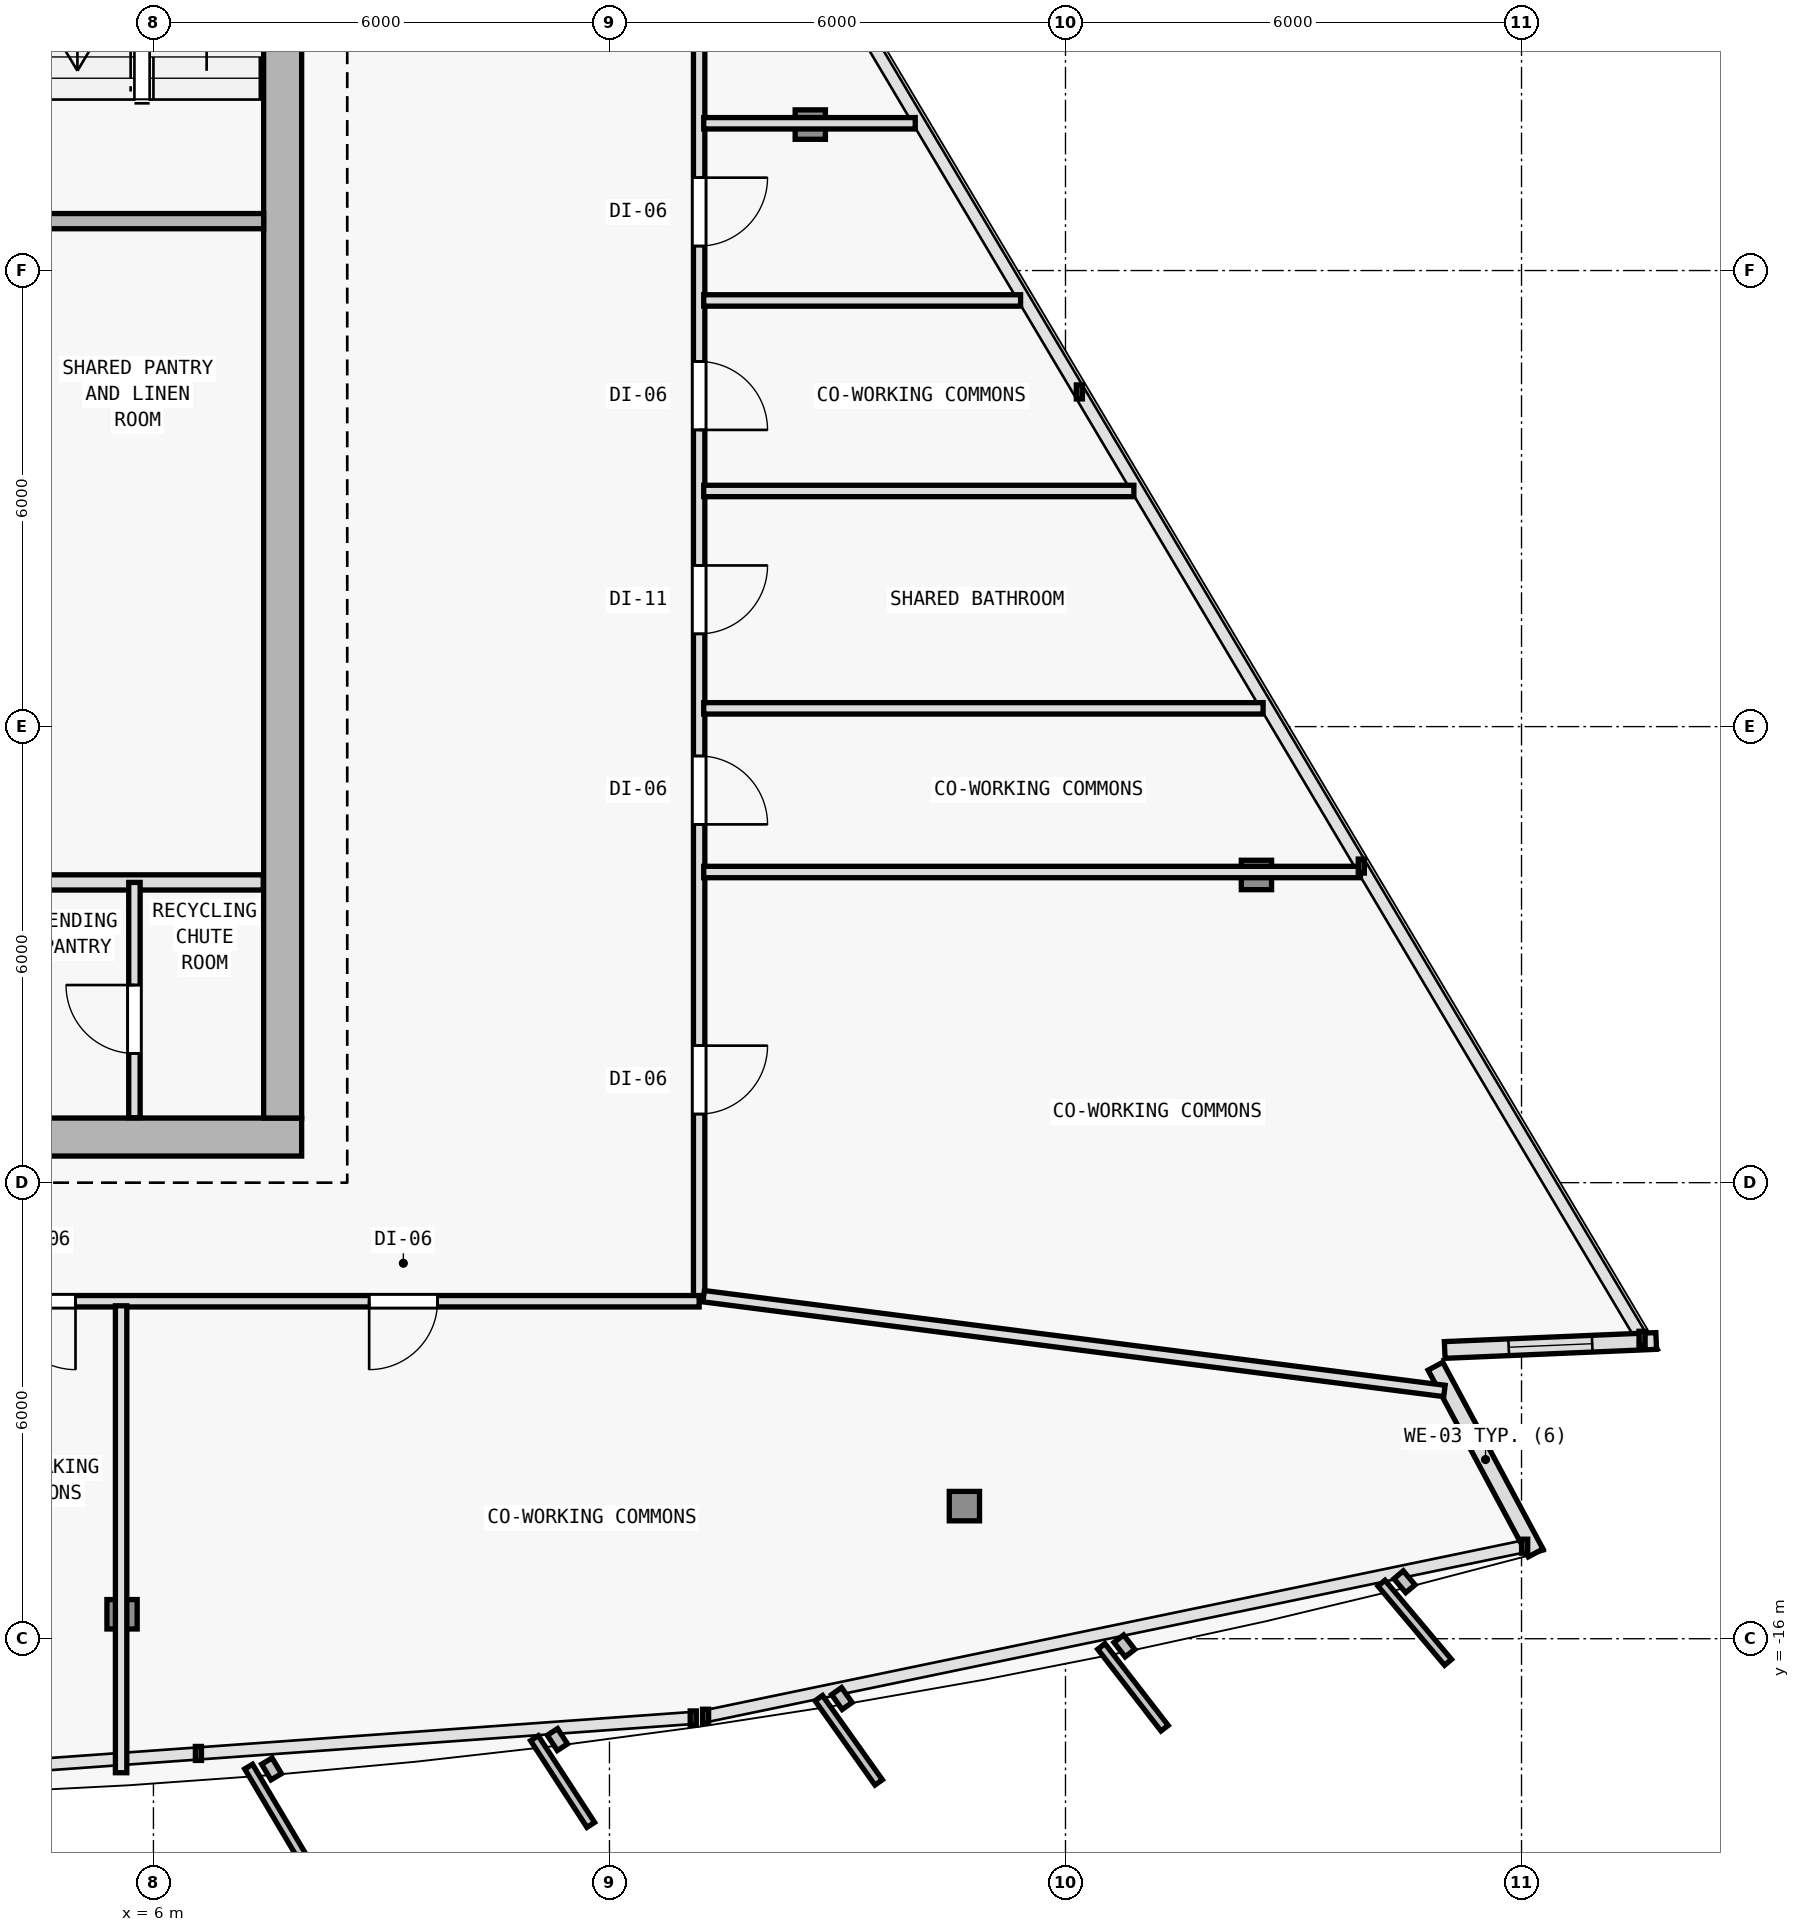
"""IFC4 building model, lengths in metres.
Left out: names, types, materials, properties, quantities, classifications, styles, units other than length and angle.
Written with IfcOpenShell. Run it as: python <this file> out.ifc"""

import sys

from ifc_helpers import new_model, si_unit, direction, frame, frame_2d, origin, origin_2d, place, context, subcontext, project, spatial, rectangle, i_section, extrude, element, fill, save


model = new_model("IFC4")
c1 = context("Model", 3, precision=1e-05, world=origin(), true_north=direction((0.0, 1.0)))
c2 = subcontext(c1, "Body", "Model", "MODEL_VIEW")
j1 = project(units=[si_unit("LENGTHUNIT", "METRE"), si_unit("PLANEANGLEUNIT", "RADIAN")], contexts=[c1])
p1 = place(None, origin())
s1 = spatial("IfcSite", under=j1, at=p1, CompositionType="ELEMENT")
p2 = place(p1, origin())
s2 = spatial("IfcBuilding", under=s1, at=p2, CompositionType="ELEMENT")
p3 = place(p2, frame((0.0, 0.0, 212.7)))
s3 = spatial("IfcBuildingStorey", under=s2, at=p3, CompositionType="ELEMENT", Elevation=212.7)
for number, where, z_axis, x_axis in (
    (1, (7.7, -9.4, 0.0), (0.0, 0.0, 1.0), (1.0, 0.0, 0.0)),
    (2, (7.7, 0.4, 0.0), (0.0, 0.0, 1.0), (1.0, 0.0, 0.0)),
):
    element("IfcColumn", number, at=place(p3, frame(where, z_axis=z_axis, x_axis=x_axis)), inside=s3, PredefinedType="COLUMN", context=c2, shape_type="SweptSolid", body=[
        extrude(i_section(OverallWidth=0.398, OverallDepth=0.387, WebThickness=0.013, FlangeThickness=0.022, FilletRadius=0.015, at=origin_2d()), origin(), (0.0, 0.0, 1.0), 3.6),
    ])
p4 = place(p3, frame((5.587, -15.678, 0.006), z_axis=(-0.006866324617, 0.035215407439, 0.999356157066), x_axis=(-0.981516643497, -0.191376797284, 0.0)))
e3 = element("IfcColumn", 3, at=p4, inside=s3, PredefinedType="COLUMN", context=c2, shape_type="SweptSolid", body=[
    extrude(i_section(OverallWidth=0.398, OverallDepth=0.387, WebThickness=0.013, FlangeThickness=0.022, FilletRadius=0.015, at=origin_2d()), origin(), (0.0, 0.0, 1.0), 3.591),
])
p5 = place(p3, frame((16.67, -14.255, 0.006), z_axis=(-0.020596292833, 0.033511459955, 0.999226087917), x_axis=(-0.851954850327, -0.523615252838, 0.0)))
e4 = element("IfcColumn", 4, at=p5, inside=s3, PredefinedType="COLUMN", context=c2, shape_type="SweptSolid", body=[
    extrude(i_section(OverallWidth=0.398, OverallDepth=0.387, WebThickness=0.013, FlangeThickness=0.022, FilletRadius=0.015, at=origin_2d()), origin(), (0.0, 0.0, 1.0), 3.592),
])
p6 = place(p3, frame((20.512, -5.952, 0.006), z_axis=(-0.026107436898, 0.021620221181, 0.999425318758), x_axis=(-0.637813971185, -0.770190455771, 0.0)))
e5 = element("IfcColumn", 5, at=p6, inside=s3, PredefinedType="COLUMN", context=c2, shape_type="SweptSolid", body=[
    extrude(i_section(OverallWidth=0.398, OverallDepth=0.387, WebThickness=0.013, FlangeThickness=0.022, FilletRadius=0.015, at=origin_2d()), origin(), (0.0, 0.0, 1.0), 3.591),
])
p7 = place(p3, frame((14.642, 3.92, 0.006), z_axis=(-0.018907326549, 0.00952167524, 0.999775900241), x_axis=(-0.449781931574, -0.893138406984, 0.0)))
e6 = element("IfcColumn", 6, at=p7, inside=s3, PredefinedType="COLUMN", context=c2, shape_type="SweptSolid", body=[
    extrude(i_section(OverallWidth=0.398, OverallDepth=0.387, WebThickness=0.013, FlangeThickness=0.022, FilletRadius=0.015, at=origin_2d()), origin(), (0.0, 0.0, 1.0), 3.59),
])
p8 = place(p3, frame((22.868, -12.415, 0.0), z_axis=(0.0, 0.0, 1.0), x_axis=(0.472845900162, -0.881145138272, 0.0)))
e7 = element("IfcWall", 7, at=p8, inside=s3, PredefinedType="SOLIDWALL", context=c2, shape_type="SweptSolid", body=[
    extrude(rectangle(XDim=2.788, YDim=0.22, at=frame_2d((1.394, 0.0))), origin(), (0.0, 0.0, 1.0), 3.35),
])
p9 = place(p3, frame((25.772, -12.083, 0.0), z_axis=(0.0, 0.0, 1.0), x_axis=(-0.999095761456, -0.042516578425, 0.0)))
e8 = element("IfcWall", 8, at=p9, inside=s3, PredefinedType="SOLIDWALL", context=c2, shape_type="SweptSolid", body=[
    extrude(rectangle(XDim=2.785, YDim=0.22, at=frame_2d((1.393, 0.0))), origin(), (0.0, 0.0, 1.0), 3.35),
])
p10 = place(p9, frame((0.843, 0.0, 0.62)))
e9 = element("IfcOpeningElement", 9, at=p10, cuts=e8, PredefinedType="OPENING", context=c2, shape_type="SweptSolid", body=[
    extrude(rectangle(XDim=1.1, YDim=1.8, at=frame_2d((0.55, 0.9))), frame((0.0, 0.12, 0.0), z_axis=(0.0, -1.0, 0.0), x_axis=(1.0, 0.0, 0.0)), (0.0, 0.0, 1.0), 0.24),
])
p11 = place(p3, frame((-7.95, -9.4, 0.0), z_axis=(0.0, 0.0, 1.0), x_axis=(1.0, 0.0, 0.0)))
e10 = element("IfcWall", 10, at=p11, inside=s3, PredefinedType="SHEAR", context=c2, shape_type="SweptSolid", body=[
    extrude(rectangle(XDim=15.9, YDim=0.5, at=frame_2d((7.95, 0.0))), origin(), (0.0, 0.0, 1.0), 3.35),
])
p12 = place(p11, frame((9.6, 0.0, 0.0)))
e11 = element("IfcOpeningElement", 11, at=p12, cuts=e10, PredefinedType="OPENING", context=c2, shape_type="SweptSolid", body=[
    extrude(rectangle(XDim=1.5, YDim=2.2, at=frame_2d((0.75, 1.1))), frame((0.0, 0.26, 0.0), z_axis=(0.0, -1.0, 0.0), x_axis=(1.0, 0.0, 0.0)), (0.0, 0.0, 1.0), 0.52),
])
p13 = place(p3, frame((7.7, 9.95, 0.0), z_axis=(0.0, 0.0, 1.0), x_axis=(0.0, -1.0, 0.0)))
e12 = element("IfcWall", 12, at=p13, inside=s3, PredefinedType="SHEAR", context=c2, shape_type="SweptSolid", body=[
    extrude(rectangle(XDim=19.1, YDim=0.5, at=frame_2d((9.55, 0.0))), origin(), (0.0, 0.0, 1.0), 3.35),
])
p14 = place(p3, frame((4.05, 2.65, 0.0), z_axis=(0.0, 0.0, 1.0), x_axis=(1.0, 0.0, 0.0)))
e13 = element("IfcWall", 13, at=p14, inside=s3, PredefinedType="SOLIDWALL", context=c2, shape_type="SweptSolid", body=[
    extrude(rectangle(XDim=3.4, YDim=0.2, at=frame_2d((1.7, 0.0))), origin(), (0.0, 0.0, 1.0), 3.35),
])
p15 = place(p3, frame((4.15, -6.05, 0.0), z_axis=(0.0, 0.0, 1.0), x_axis=(1.0, 0.0, 0.0)))
e14 = element("IfcWall", 14, at=p15, inside=s3, PredefinedType="SOLIDWALL", context=c2, shape_type="SweptSolid", body=[
    extrude(rectangle(XDim=3.295, YDim=0.2, at=frame_2d((1.647, 0.0))), origin(), (0.0, 0.0, 1.0), 3.35),
])
p16 = place(p3, frame((5.75, -9.145, 0.0), z_axis=(0.0, 0.0, 1.0), x_axis=(0.0, 1.0, 0.0)))
e15 = element("IfcWall", 15, at=p16, inside=s3, PredefinedType="PARTITIONING", context=c2, shape_type="SweptSolid", body=[
    extrude(rectangle(XDim=3.095, YDim=0.15, at=frame_2d((1.547, 0.0))), origin(), (0.0, 0.0, 1.0), 3.35),
])
p17 = place(p16, frame((0.845, 0.0, 0.0)))
e16 = element("IfcOpeningElement", 16, at=p17, cuts=e15, PredefinedType="OPENING", context=c2, shape_type="SweptSolid", body=[
    extrude(rectangle(XDim=0.9, YDim=2.1, at=frame_2d((0.45, 1.05))), frame((0.0, 0.085, 0.0), z_axis=(0.0, -1.0, 0.0), x_axis=(1.0, 0.0, 0.0)), (0.0, 0.0, 1.0), 0.17),
])
p18 = place(p3, frame((13.18, 8.444, 0.0), z_axis=(0.0, 0.0, 1.0), x_axis=(0.0, -1.0, 0.0)))
e17 = element("IfcWall", 17, at=p18, inside=s3, PredefinedType="PARTITIONING", context=c2, shape_type="SweptSolid", body=[
    extrude(rectangle(XDim=20.004, YDim=0.15, at=frame_2d((10.002, 0.0))), origin(), (0.0, 0.0, 1.0), 2.825),
])
p19 = place(p18, frame((16.641, 0.0, 0.0)))
e18 = element("IfcOpeningElement", 18, at=p19, cuts=e17, PredefinedType="OPENING", context=c2, shape_type="SweptSolid", body=[
    extrude(rectangle(XDim=0.9, YDim=2.1, at=frame_2d((0.45, 1.05))), frame((0.0, 0.085, 0.0), z_axis=(0.0, -1.0, 0.0), x_axis=(1.0, 0.0, 0.0)), (0.0, 0.0, 1.0), 0.17),
])
p20 = place(p18, frame((12.83, 0.0, 0.0)))
e19 = element("IfcOpeningElement", 19, at=p20, cuts=e17, PredefinedType="OPENING", context=c2, shape_type="SweptSolid", body=[
    extrude(rectangle(XDim=0.9, YDim=2.1, at=frame_2d((0.45, 1.05))), frame((0.0, 0.085, 0.0), z_axis=(0.0, -1.0, 0.0), x_axis=(1.0, 0.0, 0.0)), (0.0, 0.0, 1.0), 0.17),
])
p21 = place(p18, frame((10.324, 0.0, 0.0)))
e20 = element("IfcOpeningElement", 20, at=p21, cuts=e17, PredefinedType="OPENING", context=c2, shape_type="SweptSolid", body=[
    extrude(rectangle(XDim=0.9, YDim=2.1, at=frame_2d((0.45, 1.05))), frame((0.0, 0.085, 0.0), z_axis=(0.0, -1.0, 0.0), x_axis=(1.0, 0.0, 0.0)), (0.0, 0.0, 1.0), 0.17),
])
p22 = place(p18, frame((7.641, 0.0, 0.0)))
e21 = element("IfcOpeningElement", 21, at=p22, cuts=e17, PredefinedType="OPENING", context=c2, shape_type="SweptSolid", body=[
    extrude(rectangle(XDim=0.9, YDim=2.1, at=frame_2d((0.45, 1.05))), frame((0.0, 0.085, 0.0), z_axis=(0.0, -1.0, 0.0), x_axis=(1.0, 0.0, 0.0)), (0.0, 0.0, 1.0), 0.17),
])
p23 = place(p18, frame((5.222, 0.0, 0.0)))
e22 = element("IfcOpeningElement", 22, at=p23, cuts=e17, PredefinedType="OPENING", context=c2, shape_type="SweptSolid", body=[
    extrude(rectangle(XDim=0.9, YDim=2.1, at=frame_2d((0.45, 1.05))), frame((0.0, 0.085, 0.0), z_axis=(0.0, -1.0, 0.0), x_axis=(1.0, 0.0, 0.0)), (0.0, 0.0, 1.0), 0.17),
])
p24 = place(p3, frame((13.18, -11.56, 0.0), z_axis=(0.0, 0.0, 1.0), x_axis=(-1.0, 0.0, 0.0)))
e23 = element("IfcWall", 23, at=p24, inside=s3, PredefinedType="PARTITIONING", context=c2, shape_type="SweptSolid", body=[
    extrude(rectangle(XDim=23.04, YDim=0.15, at=frame_2d((11.52, 0.0))), origin(), (0.0, 0.0, 1.0), 2.825),
])
p25 = place(p24, frame((21.736, 0.0, 0.0)))
e24 = element("IfcOpeningElement", 24, at=p25, cuts=e23, PredefinedType="OPENING", context=c2, shape_type="SweptSolid", body=[
    extrude(rectangle(XDim=0.85, YDim=2.1, at=frame_2d((0.425, 1.05))), frame((0.0, 0.085, 0.0), z_axis=(0.0, -1.0, 0.0), x_axis=(1.0, 0.0, 0.0)), (0.0, 0.0, 1.0), 0.17),
])
p26 = place(p24, frame((20.304, 0.0, 0.0)))
e25 = element("IfcOpeningElement", 25, at=p26, cuts=e23, PredefinedType="OPENING", context=c2, shape_type="SweptSolid", body=[
    extrude(rectangle(XDim=0.85, YDim=2.1, at=frame_2d((0.425, 1.05))), frame((0.0, 0.085, 0.0), z_axis=(0.0, -1.0, 0.0), x_axis=(1.0, 0.0, 0.0)), (0.0, 0.0, 1.0), 0.17),
])
p27 = place(p24, frame((18.926, 0.0, 0.0)))
e26 = element("IfcOpeningElement", 26, at=p27, cuts=e23, PredefinedType="OPENING", context=c2, shape_type="SweptSolid", body=[
    extrude(rectangle(XDim=0.85, YDim=2.1, at=frame_2d((0.425, 1.05))), frame((0.0, 0.085, 0.0), z_axis=(0.0, -1.0, 0.0), x_axis=(1.0, 0.0, 0.0)), (0.0, 0.0, 1.0), 0.17),
])
p28 = place(p24, frame((17.057, 0.0, 0.0)))
e27 = element("IfcOpeningElement", 27, at=p28, cuts=e23, PredefinedType="OPENING", context=c2, shape_type="SweptSolid", body=[
    extrude(rectangle(XDim=0.9, YDim=2.1, at=frame_2d((0.45, 1.05))), frame((0.0, 0.085, 0.0), z_axis=(0.0, -1.0, 0.0), x_axis=(1.0, 0.0, 0.0)), (0.0, 0.0, 1.0), 0.17),
])
p29 = place(p24, frame((14.367, 0.0, 0.0)))
e28 = element("IfcOpeningElement", 28, at=p29, cuts=e23, PredefinedType="OPENING", context=c2, shape_type="SweptSolid", body=[
    extrude(rectangle(XDim=0.9, YDim=2.1, at=frame_2d((0.45, 1.05))), frame((0.0, 0.085, 0.0), z_axis=(0.0, -1.0, 0.0), x_axis=(1.0, 0.0, 0.0)), (0.0, 0.0, 1.0), 0.17),
])
p30 = place(p24, frame((11.09, 0.0, 0.0)))
e29 = element("IfcOpeningElement", 29, at=p30, cuts=e23, PredefinedType="OPENING", context=c2, shape_type="SweptSolid", body=[
    extrude(rectangle(XDim=0.9, YDim=2.1, at=frame_2d((0.45, 1.05))), frame((0.0, 0.085, 0.0), z_axis=(0.0, -1.0, 0.0), x_axis=(1.0, 0.0, 0.0)), (0.0, 0.0, 1.0), 0.17),
])
p31 = place(p24, frame((8.205, 0.0, 0.0)))
e30 = element("IfcOpeningElement", 30, at=p31, cuts=e23, PredefinedType="OPENING", context=c2, shape_type="SweptSolid", body=[
    extrude(rectangle(XDim=0.9, YDim=2.1, at=frame_2d((0.45, 1.05))), frame((0.0, 0.085, 0.0), z_axis=(0.0, -1.0, 0.0), x_axis=(1.0, 0.0, 0.0)), (0.0, 0.0, 1.0), 0.17),
])
p32 = place(p24, frame((3.442, 0.0, 0.0)))
e31 = element("IfcOpeningElement", 31, at=p32, cuts=e23, PredefinedType="OPENING", context=c2, shape_type="SweptSolid", body=[
    extrude(rectangle(XDim=0.9, YDim=2.1, at=frame_2d((0.45, 1.05))), frame((0.0, 0.085, 0.0), z_axis=(0.0, -1.0, 0.0), x_axis=(1.0, 0.0, 0.0)), (0.0, 0.0, 1.0), 0.17),
])
p33 = place(p3, frame((5.575, -11.62, 0.0), z_axis=(0.0, 0.0, 1.0), x_axis=(0.0, -1.0, 0.0)))
e32 = element("IfcWall", 32, at=p33, inside=s3, PredefinedType="PARTITIONING", context=c2, shape_type="SweptSolid", body=[
    extrude(rectangle(XDim=6.143, YDim=0.15, at=frame_2d((3.071, 0.0))), origin(), (0.0, 0.0, 1.0), 2.775),
])
p34 = place(p3, frame((13.24, -5.913, 0.0), z_axis=(0.0, 0.0, 1.0), x_axis=(1.0, 0.0, 0.0)))
e33 = element("IfcWall", 33, at=p34, inside=s3, PredefinedType="PARTITIONING", context=c2, shape_type="SweptSolid", body=[
    extrude(rectangle(XDim=8.64, YDim=0.15, at=frame_2d((4.32, 0.0))), origin(), (0.0, 0.0, 1.0), 2.825),
])
p35 = place(p3, frame((13.24, 3.938, 0.0), z_axis=(0.0, 0.0, 1.0), x_axis=(1.0, 0.0, 0.0)))
e34 = element("IfcWall", 34, at=p35, inside=s3, PredefinedType="PARTITIONING", context=c2, shape_type="SweptSolid", body=[
    extrude(rectangle(XDim=2.783, YDim=0.15, at=frame_2d((1.392, 0.0))), origin(), (0.0, 0.0, 1.0), 2.975),
])
p36 = place(p3, frame((13.24, -0.9, 0.0), z_axis=(0.0, 0.0, 1.0), x_axis=(1.0, 0.0, 0.0)))
e35 = element("IfcWall", 35, at=p36, inside=s3, PredefinedType="PARTITIONING", context=c2, shape_type="SweptSolid", body=[
    extrude(rectangle(XDim=5.659, YDim=0.15, at=frame_2d((2.83, 0.0))), origin(), (0.0, 0.0, 1.0), 2.975),
])
p37 = place(p3, frame((13.239, -11.494, 0.0), z_axis=(0.0, 0.0, 1.0), x_axis=(0.991917142895, -0.126887279232, 0.0)))
e36 = element("IfcWall", 36, at=p37, inside=s3, PredefinedType="PARTITIONING", context=c2, shape_type="SweptSolid", body=[
    extrude(rectangle(XDim=9.826, YDim=0.15, at=frame_2d((4.913, 0.0))), origin(), (0.0, 0.0, 1.0), 2.975),
])
p38 = place(p3, frame((13.24, -3.76, 0.0), z_axis=(0.0, 0.0, 1.0), x_axis=(1.0, 0.0, 0.0)))
e37 = element("IfcWall", 37, at=p38, inside=s3, PredefinedType="PARTITIONING", context=c2, shape_type="SweptSolid", body=[
    extrude(rectangle(XDim=7.36, YDim=0.15, at=frame_2d((3.68, 0.0))), origin(), (0.0, 0.0, 1.0), 2.975),
])
p39 = place(p3, frame((13.24, 1.606, 0.0), z_axis=(0.0, 0.0, 1.0), x_axis=(1.0, 0.0, 0.0)))
e38 = element("IfcWall", 38, at=p39, inside=s3, PredefinedType="PARTITIONING", context=c2, shape_type="SweptSolid", body=[
    extrude(rectangle(XDim=4.169, YDim=0.15, at=frame_2d((2.084, 0.0))), origin(), (0.0, 0.0, 1.0), 2.975),
])
p40 = place(p10, origin())
e39 = element("IfcWindow", 39, at=p40, inside=s3, PartitioningType="SINGLE_PANEL", PredefinedType="WINDOW", context=c2, shape_type="SweptSolid", body=[
    extrude(rectangle(XDim=1.1, YDim=1.8, at=frame_2d((0.55, 0.9))), frame((0.0, 0.03, 0.0), z_axis=(0.0, -1.0, 0.0), x_axis=(1.0, 0.0, 0.0)), (0.0, 0.0, 1.0), 0.06),
])
fill(e9, e39)
p41 = place(p17, origin())
e40 = element("IfcDoor", 40, at=p41, inside=s3, OperationType="SINGLE_SWING_RIGHT", PredefinedType="DOOR", context=c2, shape_type="SweptSolid", body=[
    extrude(rectangle(XDim=0.9, YDim=2.1, at=frame_2d((0.45, 1.05))), frame((0.0, 0.025, 0.0), z_axis=(0.0, -1.0, 0.0), x_axis=(1.0, 0.0, 0.0)), (0.0, 0.0, 1.0), 0.05),
])
fill(e16, e40)
p42 = place(p31, origin())
e41 = element("IfcDoor", 41, at=p42, inside=s3, OperationType="SINGLE_SWING_LEFT", PredefinedType="DOOR", context=c2, shape_type="SweptSolid", body=[
    extrude(rectangle(XDim=0.9, YDim=2.1, at=frame_2d((0.45, 1.05))), frame((0.0, 0.025, 0.0), z_axis=(0.0, -1.0, 0.0), x_axis=(1.0, 0.0, 0.0)), (0.0, 0.0, 1.0), 0.05),
])
fill(e30, e41)
p43 = place(p32, origin())
e42 = element("IfcDoor", 42, at=p43, inside=s3, OperationType="SINGLE_SWING_RIGHT", PredefinedType="DOOR", context=c2, shape_type="SweptSolid", body=[
    extrude(rectangle(XDim=0.9, YDim=2.1, at=frame_2d((0.45, 1.05))), frame((0.0, 0.025, 0.0), z_axis=(0.0, -1.0, 0.0), x_axis=(1.0, 0.0, 0.0)), (0.0, 0.0, 1.0), 0.05),
])
fill(e31, e42)
p44 = place(p19, origin())
e43 = element("IfcDoor", 43, at=p44, inside=s3, OperationType="SINGLE_SWING_LEFT", PredefinedType="DOOR", context=c2, shape_type="SweptSolid", body=[
    extrude(rectangle(XDim=0.9, YDim=2.1, at=frame_2d((0.45, 1.05))), frame((0.0, 0.025, 0.0), z_axis=(0.0, -1.0, 0.0), x_axis=(1.0, 0.0, 0.0)), (0.0, 0.0, 1.0), 0.05),
])
fill(e18, e43)
p45 = place(p20, origin())
e44 = element("IfcDoor", 44, at=p45, inside=s3, OperationType="SINGLE_SWING_RIGHT", PredefinedType="DOOR", context=c2, shape_type="SweptSolid", body=[
    extrude(rectangle(XDim=0.9, YDim=2.1, at=frame_2d((0.45, 1.05))), frame((0.0, 0.025, 0.0), z_axis=(0.0, -1.0, 0.0), x_axis=(1.0, 0.0, 0.0)), (0.0, 0.0, 1.0), 0.05),
])
fill(e19, e44)
p46 = place(p21, origin())
e45 = element("IfcDoor", 45, at=p46, inside=s3, OperationType="SINGLE_SWING_LEFT", PredefinedType="DOOR", context=c2, shape_type="SweptSolid", body=[
    extrude(rectangle(XDim=0.9, YDim=2.1, at=frame_2d((0.45, 1.05))), frame((0.0, 0.025, 0.0), z_axis=(0.0, -1.0, 0.0), x_axis=(1.0, 0.0, 0.0)), (0.0, 0.0, 1.0), 0.05),
])
fill(e20, e45)
p47 = place(p22, origin())
e46 = element("IfcDoor", 46, at=p47, inside=s3, OperationType="SINGLE_SWING_RIGHT", PredefinedType="DOOR", context=c2, shape_type="SweptSolid", body=[
    extrude(rectangle(XDim=0.9, YDim=2.1, at=frame_2d((0.45, 1.05))), frame((0.0, 0.025, 0.0), z_axis=(0.0, -1.0, 0.0), x_axis=(1.0, 0.0, 0.0)), (0.0, 0.0, 1.0), 0.05),
])
fill(e21, e46)
p48 = place(p23, origin())
e47 = element("IfcDoor", 47, at=p48, inside=s3, OperationType="SINGLE_SWING_LEFT", PredefinedType="DOOR", context=c2, shape_type="SweptSolid", body=[
    extrude(rectangle(XDim=0.9, YDim=2.1, at=frame_2d((0.45, 1.05))), frame((0.0, 0.025, 0.0), z_axis=(0.0, -1.0, 0.0), x_axis=(1.0, 0.0, 0.0)), (0.0, 0.0, 1.0), 0.05),
])
fill(e22, e47)
save(model, sys.argv[1])
